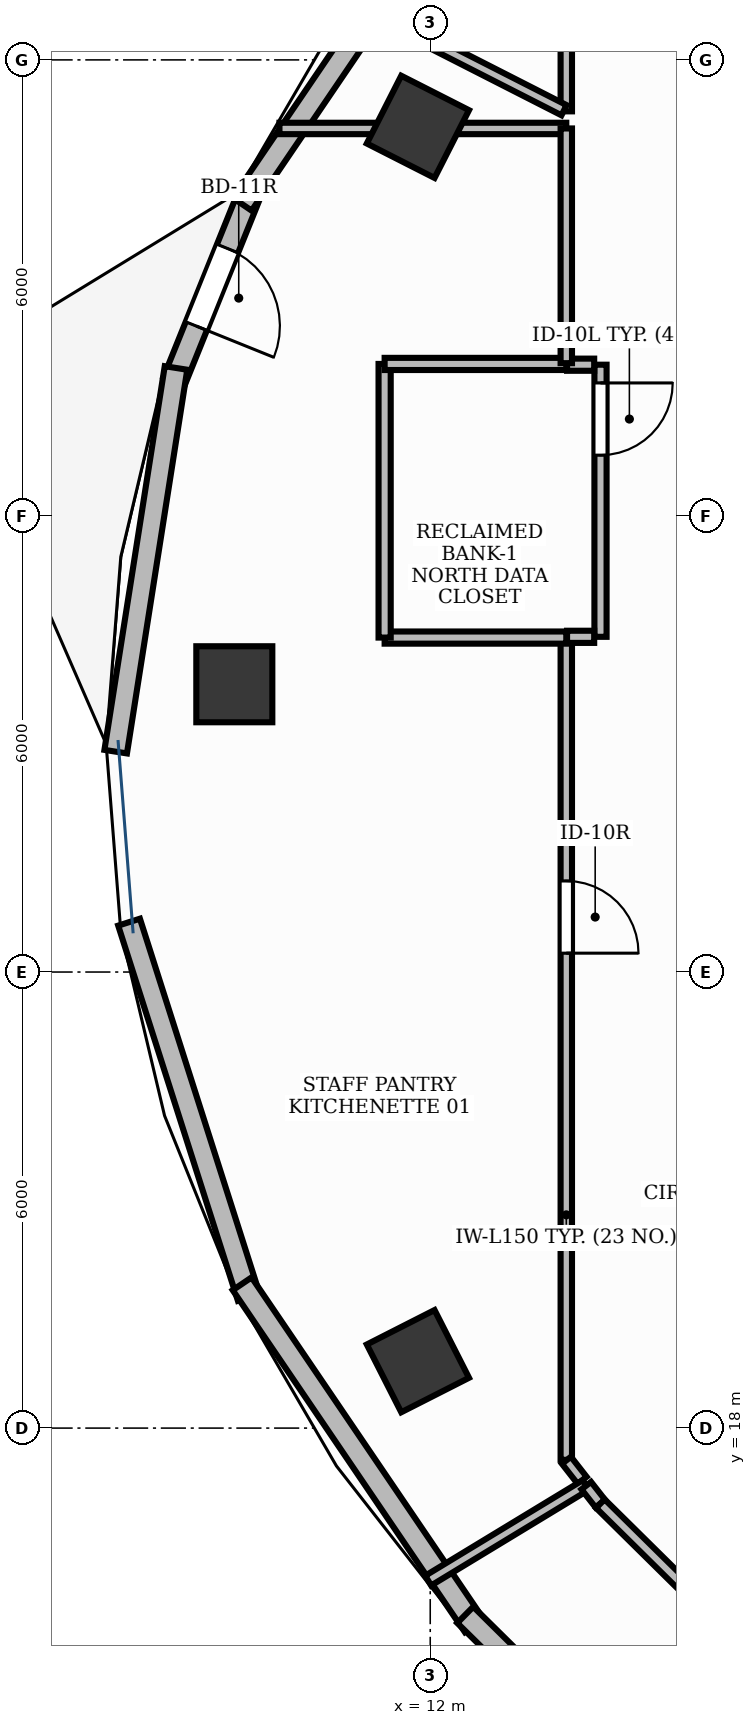
"""IFC4 building model, lengths in metres.
Left out: names, types, materials, properties, quantities, classifications, styles, units other than length and angle.
Written with IfcOpenShell. Run it as: python <this file> out.ifc"""

import sys

from ifc_helpers import new_model, si_unit, direction, frame, frame_2d, origin, origin_2d, place, context, subcontext, project, spatial, rectangle, extrude, element, fill, save


model = new_model("IFC4")
c1 = context("Model", 3, precision=1e-05, world=origin(), true_north=direction((0.0, 1.0)))
c2 = subcontext(c1, "Body", "Model", "MODEL_VIEW")
j1 = project(units=[si_unit("LENGTHUNIT", "METRE"), si_unit("PLANEANGLEUNIT", "RADIAN")], contexts=[c1])
p1 = place(None, origin())
s1 = spatial("IfcSite", under=j1, at=p1, CompositionType="ELEMENT")
p2 = place(p1, origin())
s2 = spatial("IfcBuilding", under=s1, at=p2, CompositionType="ELEMENT")
p3 = place(p2, frame((0.0, 0.0, 179.4)))
s3 = spatial("IfcBuildingStorey", under=s2, at=p3, CompositionType="ELEMENT", Elevation=179.4)
for number, where, z_axis, x_axis in (
    (1, (11.838, 35.119, -0.0), (0.0, 0.0, 1.0), (0.453, 0.891, 0.0)),
    (2, (9.423, 27.786, -0.0), (0.0, 0.0, 1.0), (0.0, 1.0, 0.0)),
    (3, (11.838, 18.881, -0.0), (0.0, 0.0, 1.0), (-0.453, 0.891, 0.0)),
):
    element("IfcColumn", number, at=place(p3, frame(where, z_axis=z_axis, x_axis=x_axis)), inside=s3, PredefinedType="COLUMN", context=c2, shape_type="SweptSolid", body=[
        extrude(rectangle(XDim=1.0, YDim=1.0, at=origin_2d()), origin(), (0.0, 0.0, 1.0), 3.901),
    ])
p4 = place(p3, frame((9.626, 34.242, 0.0), z_axis=(0.0, 0.0, 1.0), x_axis=(-0.373983610438, -0.927435312636, 0.0)))
e4 = element("IfcWall", 4, at=p4, inside=s3, PredefinedType="STANDARD", context=c2, shape_type="SweptSolid", body=[
    extrude(rectangle(XDim=2.661, YDim=0.3, at=frame_2d((1.331, 0.0))), origin(), (0.0, 0.0, 1.0), 3.9),
])
p5 = place(p4, frame((0.781, 0.0, 0.0)))
e5 = element("IfcOpeningElement", 5, at=p5, cuts=e4, PredefinedType="OPENING", context=c2, shape_type="SweptSolid", body=[
    extrude(rectangle(XDim=1.1, YDim=2.15, at=frame_2d((0.55, 1.075))), frame((0.0, 0.165, 0.0), z_axis=(0.0, -1.0, 0.0), x_axis=(1.0, 0.0, 0.0)), (0.0, 0.0, 1.0), 0.33),
])
p6 = place(p3, frame((12.58, 38.601, 0.0), z_axis=(0.0, 0.0, 1.0), x_axis=(-0.561663900064, -0.827365495634, 0.0)))
e6 = element("IfcWall", 6, at=p6, inside=s3, PredefinedType="STANDARD", context=c2, shape_type="SweptSolid", body=[
    extrude(rectangle(XDim=5.438, YDim=0.3, at=frame_2d((2.719, 0.0))), origin(), (0.0, 0.0, 1.0), 3.47),
])
p7 = place(p3, frame((8.655, 31.947, 0.0), z_axis=(0.0, 0.0, 1.0), x_axis=(-0.155280464429, -0.987870425393, 0.0)))
e7 = element("IfcWall", 7, at=p7, inside=s3, PredefinedType="STANDARD", context=c2, shape_type="SweptSolid", body=[
    extrude(rectangle(XDim=5.11, YDim=0.3, at=frame_2d((2.555, 0.0))), origin(), (0.0, 0.0, 1.0), 3.9),
])
p8 = place(p3, frame((8.038, 24.656, 0.0), z_axis=(0.0, 0.0, 1.0), x_axis=(0.303930984078, -0.952694052106, 0.0)))
e8 = element("IfcWall", 8, at=p8, inside=s3, PredefinedType="STANDARD", context=c2, shape_type="SweptSolid", body=[
    extrude(rectangle(XDim=5.181, YDim=0.3, at=frame_2d((2.591, 0.0))), origin(), (0.0, 0.0, 1.0), 3.9),
])
p9 = place(p3, frame((9.526, 19.898, 0.0), z_axis=(0.0, 0.0, 1.0), x_axis=(0.561663900064, -0.827365495634, 0.0)))
e9 = element("IfcWall", 9, at=p9, inside=s3, PredefinedType="STANDARD", context=c2, shape_type="SweptSolid", body=[
    extrude(rectangle(XDim=5.438, YDim=0.3, at=frame_2d((2.719, 0.0))), origin(), (0.0, 0.0, 1.0), 3.47),
])
p10 = place(p3, frame((12.461, 15.543, 0.0), z_axis=(0.0, 0.0, 1.0), x_axis=(0.711508162911, -0.702677830951, 0.0)))
e10 = element("IfcWall", 10, at=p10, inside=s3, PredefinedType="STANDARD", context=c2, shape_type="SweptSolid", body=[
    extrude(rectangle(XDim=2.931, YDim=0.3, at=frame_2d((1.465, 0.0))), origin(), (0.0, 0.0, 1.0), 3.47),
])
p11 = place(p3, frame((14.24, 31.99, 0.0), z_axis=(0.0, 0.0, 1.0), x_axis=(0.0, -1.0, 0.0)))
e11 = element("IfcWall", 11, at=p11, inside=s3, PredefinedType="PARTITIONING", context=c2, shape_type="SweptSolid", body=[
    extrude(rectangle(XDim=3.58, YDim=0.16, at=frame_2d((1.79, 0.0))), origin(), (0.0, 0.0, 1.0), 2.91),
])
p12 = place(p11, frame((0.24, 0.0, 0.0)))
e12 = element("IfcOpeningElement", 12, at=p12, cuts=e11, PredefinedType="OPENING", context=c2, shape_type="SweptSolid", body=[
    extrude(rectangle(XDim=0.95, YDim=2.15, at=frame_2d((0.475, 1.075))), frame((0.0, 0.095, 0.0), z_axis=(0.0, -1.0, 0.0), x_axis=(1.0, 0.0, 0.0)), (0.0, 0.0, 1.0), 0.19),
])
p13 = place(p3, frame((13.79, 28.39, 0.0), z_axis=(0.0, 0.0, 1.0), x_axis=(0.0, -1.0, 0.0)))
e13 = element("IfcWall", 13, at=p13, inside=s3, PredefinedType="PARTITIONING", context=c2, shape_type="SweptSolid", body=[
    extrude(rectangle(XDim=10.807, YDim=0.15, at=frame_2d((5.404, 0.0))), origin(), (0.0, 0.0, 1.0), 2.91),
])
p14 = place(p13, frame((3.192, 0.0, 0.0)))
e14 = element("IfcOpeningElement", 14, at=p14, cuts=e13, PredefinedType="OPENING", context=c2, shape_type="SweptSolid", body=[
    extrude(rectangle(XDim=0.95, YDim=2.15, at=frame_2d((0.475, 1.075))), frame((0.0, 0.09, 0.0), z_axis=(0.0, -1.0, 0.0), x_axis=(1.0, 0.0, 0.0)), (0.0, 0.0, 1.0), 0.18),
])
for number, where, z_axis, x_axis in (
    (15, (13.8, 31.99, 0.0), (0.0, 0.0, 1.0), (1.0, 0.0, 0.0)),
    (16, (14.157, 28.41, 0.0), (0.0, 0.0, 1.0), (-1.0, 0.0, 0.0)),
):
    element("IfcWall", number, at=place(p3, frame(where, z_axis=z_axis, x_axis=x_axis)), inside=s3, PredefinedType="PARTITIONING", context=c2, shape_type="SweptSolid", body=[
        extrude(rectangle(XDim=0.357, YDim=0.16, at=frame_2d((0.178, 0.0))), origin(), (0.0, 0.0, 1.0), 2.91),
    ])
p15 = place(p3, frame((13.79, 28.4, 0.0), z_axis=(0.0, 0.0, 1.0), x_axis=(-1.0, 0.0, 0.0)))
e17 = element("IfcWall", 17, at=p15, inside=s3, PredefinedType="PARTITIONING", context=c2, shape_type="SweptSolid", body=[
    extrude(rectangle(XDim=2.39, YDim=0.16, at=frame_2d((1.195, 0.0))), origin(), (0.0, 0.0, 1.0), 2.91),
])
p16 = place(p3, frame((11.4, 28.4, 0.0), z_axis=(0.0, 0.0, 1.0), x_axis=(0.0, 1.0, 0.0)))
e18 = element("IfcWall", 18, at=p16, inside=s3, PredefinedType="PARTITIONING", context=c2, shape_type="SweptSolid", body=[
    extrude(rectangle(XDim=3.6, YDim=0.16, at=frame_2d((1.8, 0.0))), origin(), (0.0, 0.0, 1.0), 2.91),
])
p17 = place(p3, frame((11.4, 32.0, 0.0), z_axis=(0.0, 0.0, 1.0), x_axis=(1.0, 0.0, 0.0)))
e19 = element("IfcWall", 19, at=p17, inside=s3, PredefinedType="PARTITIONING", context=c2, shape_type="SweptSolid", body=[
    extrude(rectangle(XDim=2.39, YDim=0.16, at=frame_2d((1.195, 0.0))), origin(), (0.0, 0.0, 1.0), 2.91),
])
p18 = place(p3, frame((10.016, 35.098, 0.0), z_axis=(0.0, 0.0, 1.0), x_axis=(1.0, 0.0, 0.0)))
e20 = element("IfcWall", 20, at=p18, inside=s3, PredefinedType="PARTITIONING", context=c2, shape_type="SweptSolid", body=[
    extrude(rectangle(XDim=3.774, YDim=0.15, at=frame_2d((1.887, 0.0))), origin(), (0.0, 0.0, 1.0), 2.91),
])
p19 = place(p3, frame((13.79, 35.098, 0.0), z_axis=(0.0, 0.0, 1.0), x_axis=(0.0, -1.0, 0.0)))
e21 = element("IfcWall", 21, at=p19, inside=s3, PredefinedType="PARTITIONING", context=c2, shape_type="SweptSolid", body=[
    extrude(rectangle(XDim=3.088, YDim=0.15, at=frame_2d((1.544, 0.0))), origin(), (0.0, 0.0, 1.0), 2.91),
])
p20 = place(p3, frame((13.792, 17.576, 0.0), z_axis=(0.0, 0.0, 1.0), x_axis=(0.61611141045, -0.78765901881, 0.0)))
e22 = element("IfcWall", 22, at=p20, inside=s3, PredefinedType="PARTITIONING", context=c2, shape_type="SweptSolid", body=[
    extrude(rectangle(XDim=0.334, YDim=0.15, at=frame_2d((0.167, 0.0))), origin(), (0.0, 0.0, 1.0), 2.91),
])
p21 = place(p3, frame((14.046, 17.251, 0.0), z_axis=(0.0, 0.0, 1.0), x_axis=(-0.854959737725, -0.518694367494, 0.0)))
e23 = element("IfcWall", 23, at=p21, inside=s3, PredefinedType="PARTITIONING", context=c2, shape_type="SweptSolid", body=[
    extrude(rectangle(XDim=2.425, YDim=0.15, at=frame_2d((1.212, 0.0))), origin(), (0.0, 0.0, 1.0), 2.91),
])
p22 = place(p3, frame((14.052, 17.243, 0.0), z_axis=(0.0, 0.0, 1.0), x_axis=(0.615628260214, -0.788036702969, 0.0)))
e24 = element("IfcWall", 24, at=p22, inside=s3, PredefinedType="PARTITIONING", context=c2, shape_type="SweptSolid", body=[
    extrude(rectangle(XDim=0.3, YDim=0.16, at=frame_2d((0.15, 0.0))), origin(), (0.0, 0.0, 1.0), 2.91),
])
p23 = place(p3, frame((14.238, 17.006, 0.0), z_axis=(0.0, 0.0, 1.0), x_axis=(0.711447157113, -0.702739598027, 0.0)))
e25 = element("IfcWall", 25, at=p23, inside=s3, PredefinedType="PARTITIONING", context=c2, shape_type="SweptSolid", body=[
    extrude(rectangle(XDim=2.467, YDim=0.16, at=frame_2d((1.234, 0.0))), origin(), (0.0, 0.0, 1.0), 2.91),
])
p24 = place(p3, frame((13.79, 36.417, 0.0), z_axis=(0.0, 0.0, 1.0), x_axis=(0.0, -1.0, 0.0)))
e26 = element("IfcWall", 26, at=p24, inside=s3, PredefinedType="PARTITIONING", context=c2, shape_type="SweptSolid", body=[
    extrude(rectangle(XDim=1.094, YDim=0.15, at=frame_2d((0.547, 0.0))), origin(), (0.0, 0.0, 1.0), 2.91),
])
p25 = place(p3, frame((13.76, 35.338, 0.0), z_axis=(0.0, 0.0, 1.0), x_axis=(-0.890989702295, 0.454023513053, 0.0)))
e27 = element("IfcWall", 27, at=p25, inside=s3, PredefinedType="PARTITIONING", context=c2, shape_type="SweptSolid", body=[
    extrude(rectangle(XDim=3.106, YDim=0.15, at=frame_2d((1.553, 0.0))), origin(), (0.0, 0.0, 1.0), 2.91),
])
p26 = place(p5, origin())
e28 = element("IfcDoor", 28, at=p26, inside=s3, OperationType="SINGLE_SWING_RIGHT", PredefinedType="DOOR", context=c2, shape_type="SweptSolid", body=[
    extrude(rectangle(XDim=1.1, YDim=2.15, at=frame_2d((0.55, 1.075))), frame((0.0, 0.025, 0.0), z_axis=(0.0, -1.0, 0.0), x_axis=(1.0, 0.0, 0.0)), (0.0, 0.0, 1.0), 0.05),
])
fill(e5, e28)
p27 = place(p12, origin())
e29 = element("IfcDoor", 29, at=p27, inside=s3, OperationType="SINGLE_SWING_LEFT", PredefinedType="DOOR", context=c2, shape_type="SweptSolid", body=[
    extrude(rectangle(XDim=0.95, YDim=2.15, at=frame_2d((0.475, 1.075))), frame((0.0, 0.025, 0.0), z_axis=(0.0, -1.0, 0.0), x_axis=(1.0, 0.0, 0.0)), (0.0, 0.0, 1.0), 0.05),
])
fill(e12, e29)
p28 = place(p14, origin())
e30 = element("IfcDoor", 30, at=p28, inside=s3, OperationType="SINGLE_SWING_RIGHT", PredefinedType="DOOR", context=c2, shape_type="SweptSolid", body=[
    extrude(rectangle(XDim=0.95, YDim=2.15, at=frame_2d((0.475, 1.075))), frame((0.0, 0.025, 0.0), z_axis=(0.0, -1.0, 0.0), x_axis=(1.0, 0.0, 0.0)), (0.0, 0.0, 1.0), 0.05),
])
fill(e14, e30)
save(model, sys.argv[1])
